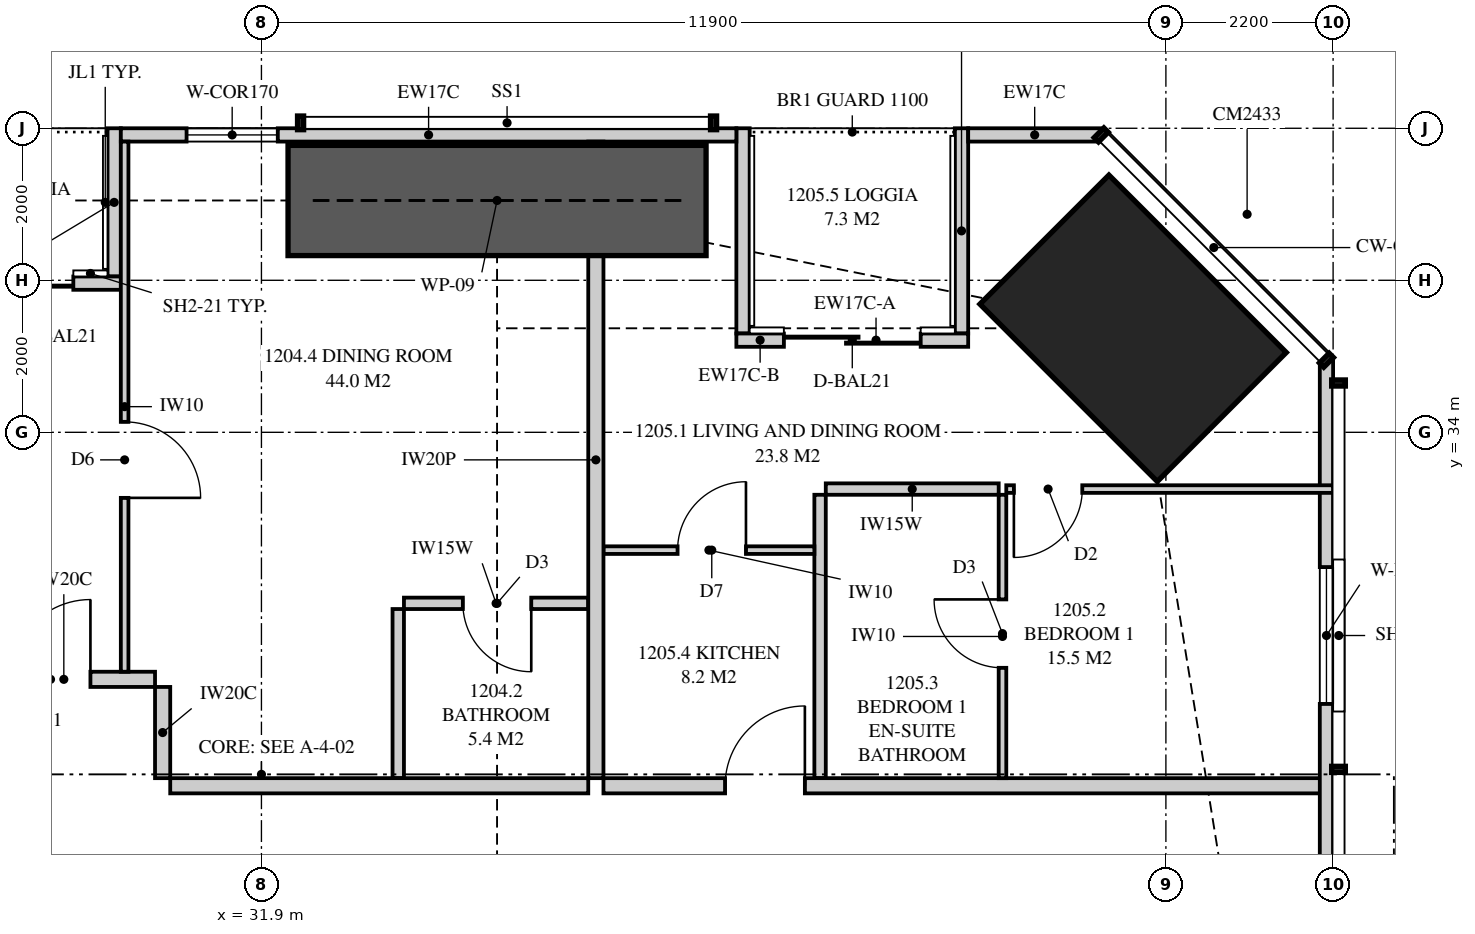
"""IFC4 building model, lengths in metres.
Left out: names, types, materials, properties, quantities, classifications, styles, units other than length and angle.
Written with IfcOpenShell. Run it as: python <this file> out.ifc"""

import sys

from ifc_helpers import new_model, si_unit, direction, frame, frame_2d, origin, origin_2d, place, context, subcontext, project, spatial, polyline, rectangle, outline, extrude, element, fill, save


model = new_model("IFC4")
c1 = context("Model", 3, precision=1e-05, world=origin(), true_north=direction((0.0, 1.0)))
c2 = subcontext(c1, "Body", "Model", "MODEL_VIEW")
j1 = project(units=[si_unit("LENGTHUNIT", "METRE"), si_unit("PLANEANGLEUNIT", "RADIAN")], contexts=[c1])
p1 = place(None, origin())
s1 = spatial("IfcSite", under=j1, at=p1, CompositionType="ELEMENT")
p2 = place(p1, origin())
s2 = spatial("IfcBuilding", under=s1, at=p2, CompositionType="ELEMENT")
p3 = place(p2, frame((0.0, 0.0, 47.8)))
s3 = spatial("IfcBuildingStorey", under=s2, at=p3, CompositionType="ELEMENT", Elevation=47.8)
p4 = place(p3, frame((43.369, 35.369, 0.0), z_axis=(0.0, 0.0, 1.0), x_axis=(-0.707106781187, -0.707106781187, 0.0)))
e1 = element("IfcColumn", 1, at=p4, inside=s3, PredefinedType="COLUMN", context=c2, shape_type="SweptSolid", body=[
    extrude(rectangle(XDim=2.4, YDim=3.3, at=origin_2d()), origin(), (0.0, 0.0, 1.0), 3.35),
])
p5 = place(p3, frame((45.913, 3.051, 0.0), z_axis=(0.0, 0.0, 1.0), x_axis=(0.0, 1.0, 0.0)))
e2 = element("IfcWall", 2, at=p5, inside=s3, PredefinedType="SOLIDWALL", context=c2, shape_type="SweptSolid", body=[
    extrude(outline(polyline([(0.0, 0.0), (31.897, 0.0), (31.897, 3.11), (22.167, 3.11), (22.167, 2.15), (22.074, 2.15), (22.074, 3.11), (21.949, 3.11), (21.949, 2.15), (9.949, 2.15), (9.949, 3.11), (9.823, 3.11), (9.823, 2.15), (9.73, 2.15), (9.73, 3.11), (0.0, 3.11), (0.0, 0.0)])), frame((0.0, 0.087, 0.0), z_axis=(0.0, -1.0, 0.0), x_axis=(1.0, 0.0, 0.0)), (0.0, 0.0, 1.0), 0.175),
])
p6 = place(p5, frame((2.222, 0.0, 0.4)))
e3 = element("IfcOpeningElement", 3, at=p6, cuts=e2, PredefinedType="OPENING", context=c2, shape_type="SweptSolid", body=[
    extrude(rectangle(XDim=1.8, YDim=1.7, at=frame_2d((0.9, 0.85))), frame((0.0, 0.097, 0.0), z_axis=(0.0, -1.0, 0.0), x_axis=(1.0, 0.0, 0.0)), (0.0, 0.0, 1.0), 0.195),
])
p7 = place(p5, frame((14.849, 0.0, 0.4)))
e4 = element("IfcOpeningElement", 4, at=p7, cuts=e2, PredefinedType="OPENING", context=c2, shape_type="SweptSolid", body=[
    extrude(rectangle(XDim=1.2, YDim=1.7, at=frame_2d((0.6, 0.85))), frame((0.0, 0.097, 0.0), z_axis=(0.0, -1.0, 0.0), x_axis=(1.0, 0.0, 0.0)), (0.0, 0.0, 1.0), 0.195),
])
p8 = place(p5, frame((27.375, 0.0, 0.4)))
e5 = element("IfcOpeningElement", 5, at=p8, cuts=e2, PredefinedType="OPENING", context=c2, shape_type="SweptSolid", body=[
    extrude(rectangle(XDim=1.8, YDim=1.7, at=frame_2d((0.9, 0.85))), frame((0.0, 0.097, 0.0), z_axis=(0.0, -1.0, 0.0), x_axis=(1.0, 0.0, 0.0)), (0.0, 0.0, 1.0), 0.195),
])
p9 = place(p3, frame((42.949, 37.913, 0.0), z_axis=(0.0, 0.0, 1.0), x_axis=(-1.0, 0.0, 0.0)))
e6 = element("IfcWall", 6, at=p9, inside=s3, PredefinedType="SOLIDWALL", context=c2, shape_type="SweptSolid", body=[
    extrude(rectangle(XDim=1.75, YDim=0.175, at=frame_2d((0.875, 0.0))), origin(), (0.0, 0.0, 1.0), 3.11),
])
p10 = place(p3, frame((38.149, 37.913, 0.0), z_axis=(0.0, 0.0, 1.0), x_axis=(-1.0, 0.0, 0.0)))
e7 = element("IfcWall", 7, at=p10, inside=s3, PredefinedType="SOLIDWALL", context=c2, shape_type="SweptSolid", body=[
    extrude(outline(polyline([(0.0, 0.0), (8.099, 0.0), (8.099, 2.15), (3.149, 2.15), (3.149, 3.11), (2.993, 3.11), (2.993, 2.15), (2.945, 2.15), (2.945, 3.11), (0.0, 3.11), (0.0, 0.0)])), frame((0.0, 0.087, 0.0), z_axis=(0.0, -1.0, 0.0), x_axis=(1.0, 0.0, 0.0)), (0.0, 0.0, 1.0), 0.175),
])
p11 = place(p10, frame((6.034, 0.0, 0.4)))
e8 = element("IfcOpeningElement", 8, at=p11, cuts=e7, PredefinedType="OPENING", context=c2, shape_type="SweptSolid", body=[
    extrude(rectangle(XDim=1.2, YDim=1.7, at=frame_2d((0.6, 0.85))), frame((0.0, 0.097, 0.0), z_axis=(0.0, -1.0, 0.0), x_axis=(1.0, 0.0, 0.0)), (0.0, 0.0, 1.0), 0.195),
])
p12 = place(p3, frame((41.199, 35.212, 0.0), z_axis=(0.0, 0.0, 1.0), x_axis=(-1.0, 0.0, 0.0)))
e9 = element("IfcWall", 9, at=p12, inside=s3, PredefinedType="SOLIDWALL", context=c2, shape_type="SweptSolid", body=[
    extrude(rectangle(XDim=2.425, YDim=0.175, at=frame_2d((1.212, 0.0))), origin(), (0.0, 0.0, 1.0), 2.15),
])
p13 = place(p12, frame((0.625, 0.0, 0.0)))
e10 = element("IfcOpeningElement", 10, at=p13, cuts=e9, PredefinedType="OPENING", context=c2, shape_type="SweptSolid", body=[
    extrude(rectangle(XDim=1.8, YDim=2.1, at=frame_2d((0.9, 1.05))), frame((0.0, 0.097, 0.0), z_axis=(0.0, -1.0, 0.0), x_axis=(1.0, 0.0, 0.0)), (0.0, 0.0, 1.0), 0.195),
])
p14 = place(p3, frame((38.774, 35.212, 0.0), z_axis=(0.0, 0.0, 1.0), x_axis=(-1.0, 0.0, 0.0)))
e11 = element("IfcWall", 11, at=p14, inside=s3, PredefinedType="SOLIDWALL", context=c2, shape_type="SweptSolid", body=[
    extrude(rectangle(XDim=0.625, YDim=0.175, at=frame_2d((0.312, 0.0))), origin(), (0.0, 0.0, 1.0), 2.51),
])
p15 = place(p3, frame((41.111, 38.0, 0.0), z_axis=(0.0, 0.0, 1.0), x_axis=(0.0, -1.0, 0.0)))
e12 = element("IfcWall", 12, at=p15, inside=s3, PredefinedType="SOLIDWALL", context=c2, shape_type="SweptSolid", body=[
    extrude(outline(polyline([(0.0, 0.0), (2.7, 0.0), (2.7, 2.15), (1.344, 2.15), (1.344, 3.11), (0.0, 3.11), (0.0, 0.0)])), frame((0.0, 0.087, 0.0), z_axis=(0.0, -1.0, 0.0), x_axis=(1.0, 0.0, 0.0)), (0.0, 0.0, 1.0), 0.175),
])
p16 = place(p3, frame((38.236, 38.0, 0.0), z_axis=(0.0, 0.0, 1.0), x_axis=(0.0, -1.0, 0.0)))
e13 = element("IfcWall", 13, at=p16, inside=s3, PredefinedType="SOLIDWALL", context=c2, shape_type="SweptSolid", body=[
    extrude(outline(polyline([(0.0, 0.0), (2.7, 0.0), (2.7, 2.51), (2.434, 2.51), (2.434, 2.15), (0.767, 2.15), (0.767, 3.11), (0.0, 3.11), (0.0, 0.0)])), frame((0.0, 0.087, 0.0), z_axis=(0.0, -1.0, 0.0), x_axis=(1.0, 0.0, 0.0)), (0.0, 0.0, 1.0), 0.175),
])
p17 = place(p3, frame((30.05, 35.962, 0.0), z_axis=(0.0, 0.0, 1.0), x_axis=(-1.0, 0.0, 0.0)))
e14 = element("IfcWall", 14, at=p17, inside=s3, PredefinedType="SOLIDWALL", context=c2, shape_type="SweptSolid", body=[
    extrude(rectangle(XDim=3.05, YDim=0.175, at=frame_2d((1.525, 0.0))), origin(), (0.0, 0.0, 1.0), 3.11),
])
p18 = place(p17, frame((0.625, 0.0, 0.0)))
e15 = element("IfcOpeningElement", 15, at=p18, cuts=e14, PredefinedType="OPENING", context=c2, shape_type="SweptSolid", body=[
    extrude(rectangle(XDim=1.8, YDim=2.1, at=frame_2d((0.9, 1.05))), frame((0.0, 0.097, 0.0), z_axis=(0.0, -1.0, 0.0), x_axis=(1.0, 0.0, 0.0)), (0.0, 0.0, 1.0), 0.195),
])
p19 = place(p3, frame((29.962, 38.0, 0.0), z_axis=(0.0, 0.0, 1.0), x_axis=(0.0, -1.0, 0.0)))
e16 = element("IfcWall", 16, at=p19, inside=s3, PredefinedType="SOLIDWALL", context=c2, shape_type="SweptSolid", body=[
    extrude(outline(polyline([(0.0, 0.0), (1.95, 0.0), (1.95, 3.11), (1.75, 3.11), (1.75, 2.15), (0.15, 2.15), (0.15, 3.11), (0.0, 3.11), (0.0, 0.0)])), frame((0.0, 0.087, 0.0), z_axis=(0.0, -1.0, 0.0), x_axis=(1.0, 0.0, 0.0)), (0.0, 0.0, 1.0), 0.175),
])
p20 = place(p3, frame((36.3, 37.825, 0.0), z_axis=(0.0, 0.0, 1.0), x_axis=(0.0, -1.0, 0.0)))
e17 = element("IfcWall", 17, at=p20, inside=s3, PredefinedType="PARTITIONING", context=c2, shape_type="SweptSolid", body=[
    extrude(outline(polyline([(0.108, 3.11), (0.0, 3.11), (0.0, 0.0), (0.529, 0.0), (0.529, 0.608), (1.021, 0.608), (1.021, 0.0), (8.375, 0.0), (8.375, 3.11), (3.766, 3.11), (3.766, 2.51), (1.964, 2.51), (1.964, 2.15), (1.021, 2.15), (1.021, 1.542), (0.529, 1.542), (0.529, 2.15), (0.108, 2.15), (0.108, 3.11)])), frame((0.0, 0.1, 0.0), z_axis=(0.0, -1.0, 0.0), x_axis=(1.0, 0.0, 0.0)), (0.0, 0.0, 1.0), 0.2),
])
p21 = place(p3, frame((33.775, 31.75, 0.0), z_axis=(0.0, 0.0, 1.0), x_axis=(1.0, 0.0, 0.0)))
e18 = element("IfcWall", 18, at=p21, inside=s3, PredefinedType="PLUMBINGWALL", context=c2, shape_type="SweptSolid", body=[
    extrude(outline(polyline([(0.0, 0.0), (2.425, 0.0), (2.425, 3.11), (1.537, 3.11), (1.537, 2.541), (0.913, 2.541), (0.913, 3.11), (0.0, 3.11), (0.0, 0.0)])), frame((0.0, 0.075, 0.0), z_axis=(0.0, -1.0, 0.0), x_axis=(1.0, 0.0, 0.0)), (0.0, 0.0, 1.0), 0.15),
])
p22 = place(p21, frame((0.775, 0.0, 0.0)))
e19 = element("IfcOpeningElement", 19, at=p22, cuts=e18, PredefinedType="OPENING", context=c2, shape_type="SweptSolid", body=[
    extrude(rectangle(XDim=0.9, YDim=2.1, at=frame_2d((0.45, 1.05))), frame((0.0, 0.085, 0.0), z_axis=(0.0, -1.0, 0.0), x_axis=(1.0, 0.0, 0.0)), (0.0, 0.0, 1.0), 0.17),
])
p23 = place(p3, frame((33.7, 31.675, 0.0), z_axis=(0.0, 0.0, 1.0), x_axis=(0.0, -1.0, 0.0)))
e20 = element("IfcWall", 20, at=p23, inside=s3, PredefinedType="PLUMBINGWALL", context=c2, shape_type="SweptSolid", body=[
    extrude(rectangle(XDim=2.225, YDim=0.15, at=frame_2d((1.113, 0.0))), origin(), (0.0, 0.0, 1.0), 3.11),
])
p24 = place(p3, frame((30.1, 37.825, 0.0), z_axis=(0.0, 0.0, 1.0), x_axis=(0.0, -1.0, 0.0)))
e21 = element("IfcWall", 21, at=p24, inside=s3, PredefinedType="PARTITIONING", context=c2, shape_type="SweptSolid", body=[
    extrude(outline(polyline([(0.0, 0.0), (6.975, 0.0), (6.975, 3.11), (1.635, 3.11), (1.635, 2.15), (0.0, 2.15), (0.0, 3.11), (0.0, 0.0)])), frame((0.0, 0.05, 0.0), z_axis=(0.0, -1.0, 0.0), x_axis=(1.0, 0.0, 0.0)), (0.0, 0.0, 1.0), 0.1),
])
p25 = place(p24, frame((3.688, 0.0, 0.0)))
e22 = element("IfcOpeningElement", 22, at=p25, cuts=e21, PredefinedType="OPENING", context=c2, shape_type="SweptSolid", body=[
    extrude(rectangle(XDim=1.0, YDim=2.1, at=frame_2d((0.5, 1.05))), frame((0.0, 0.06, 0.0), z_axis=(0.0, -1.0, 0.0), x_axis=(1.0, 0.0, 0.0)), (0.0, 0.0, 1.0), 0.12),
])
p26 = place(p3, frame((36.4, 29.35, 0.0), z_axis=(0.0, 0.0, 1.0), x_axis=(1.0, 0.0, 0.0)))
e23 = element("IfcWall", 23, at=p26, inside=s3, PredefinedType="PARTITIONING", context=c2, shape_type="SweptSolid", body=[
    extrude(outline(polyline([(0.0, 0.0), (9.6, 0.0), (9.6, 3.11), (8.866, 3.11), (8.866, 2.15), (7.023, 2.15), (7.023, 3.11), (0.0, 3.11), (0.0, 0.0)])), frame((0.0, 0.1, 0.0), z_axis=(0.0, -1.0, 0.0), x_axis=(1.0, 0.0, 0.0)), (0.0, 0.0, 1.0), 0.2),
])
p27 = place(p26, frame((1.6, 0.0, 0.0)))
e24 = element("IfcOpeningElement", 24, at=p27, cuts=e23, PredefinedType="OPENING", context=c2, shape_type="SweptSolid", body=[
    extrude(rectangle(XDim=1.05, YDim=2.2, at=frame_2d((0.525, 1.1))), frame((0.0, 0.11, 0.0), z_axis=(0.0, -1.0, 0.0), x_axis=(1.0, 0.0, 0.0)), (0.0, 0.0, 1.0), 0.22),
])
p28 = place(p3, frame((41.65, 33.178, 0.0), z_axis=(0.0, 0.0, 1.0), x_axis=(0.0, -1.0, 0.0)))
e25 = element("IfcWall", 25, at=p28, inside=s3, PredefinedType="PARTITIONING", context=c2, shape_type="SweptSolid", body=[
    extrude(rectangle(XDim=3.728, YDim=0.1, at=frame_2d((1.864, 0.0))), origin(), (0.0, 0.0, 1.0), 3.11),
])
p29 = place(p28, frame((1.377, 0.0, 0.0)))
e26 = element("IfcOpeningElement", 26, at=p29, cuts=e25, PredefinedType="OPENING", context=c2, shape_type="SweptSolid", body=[
    extrude(rectangle(XDim=0.9, YDim=2.1, at=frame_2d((0.45, 1.05))), frame((0.0, 0.06, 0.0), z_axis=(0.0, -1.0, 0.0), x_axis=(1.0, 0.0, 0.0)), (0.0, 0.0, 1.0), 0.12),
])
p30 = place(p3, frame((41.7, 33.253, 0.0), z_axis=(0.0, 0.0, 1.0), x_axis=(1.0, 0.0, 0.0)))
e27 = element("IfcWall", 27, at=p30, inside=s3, PredefinedType="PARTITIONING", context=c2, shape_type="SweptSolid", body=[
    extrude(outline(polyline([(0.0, 0.0), (4.3, 0.0), (4.3, 3.11), (2.883, 3.11), (2.883, 2.15), (1.14, 2.15), (1.14, 3.11), (0.0, 3.11), (0.0, 0.0)])), frame((0.0, 0.05, 0.0), z_axis=(0.0, -1.0, 0.0), x_axis=(1.0, 0.0, 0.0)), (0.0, 0.0, 1.0), 0.1),
])
p31 = place(p30, frame((0.1, 0.0, 0.0)))
e28 = element("IfcOpeningElement", 28, at=p31, cuts=e27, PredefinedType="OPENING", context=c2, shape_type="SweptSolid", body=[
    extrude(rectangle(XDim=0.9, YDim=2.1, at=frame_2d((0.45, 1.05))), frame((0.0, 0.06, 0.0), z_axis=(0.0, -1.0, 0.0), x_axis=(1.0, 0.0, 0.0)), (0.0, 0.0, 1.0), 0.12),
])
p32 = place(p3, frame((39.325, 33.253, 0.0), z_axis=(0.0, 0.0, 1.0), x_axis=(1.0, 0.0, 0.0)))
e29 = element("IfcWall", 29, at=p32, inside=s3, PredefinedType="PLUMBINGWALL", context=c2, shape_type="SweptSolid", body=[
    extrude(rectangle(XDim=2.275, YDim=0.15, at=frame_2d((1.138, 0.0))), origin(), (0.0, 0.0, 1.0), 3.11),
])
p33 = place(p3, frame((39.25, 33.178, 0.0), z_axis=(0.0, 0.0, 1.0), x_axis=(0.0, -1.0, 0.0)))
e30 = element("IfcWall", 30, at=p33, inside=s3, PredefinedType="PLUMBINGWALL", context=c2, shape_type="SweptSolid", body=[
    extrude(rectangle(XDim=3.728, YDim=0.15, at=frame_2d((1.864, 0.0))), origin(), (0.0, 0.0, 1.0), 3.11),
])
p34 = place(p3, frame((36.4, 32.45, 0.0), z_axis=(0.0, 0.0, 1.0), x_axis=(1.0, 0.0, 0.0)))
e31 = element("IfcWall", 31, at=p34, inside=s3, PredefinedType="PARTITIONING", context=c2, shape_type="SweptSolid", body=[
    extrude(rectangle(XDim=2.775, YDim=0.1, at=frame_2d((1.388, 0.0))), origin(), (0.0, 0.0, 1.0), 3.11),
])
p35 = place(p34, frame((0.975, 0.0, 0.0)))
e32 = element("IfcOpeningElement", 32, at=p35, cuts=e31, PredefinedType="OPENING", context=c2, shape_type="SweptSolid", body=[
    extrude(rectangle(XDim=0.9, YDim=2.1, at=frame_2d((0.45, 1.05))), frame((0.0, 0.06, 0.0), z_axis=(0.0, -1.0, 0.0), x_axis=(1.0, 0.0, 0.0)), (0.0, 0.0, 1.0), 0.12),
])
p36 = place(p3, frame((30.7, 29.35, 0.0), z_axis=(0.0, 0.0, 1.0), x_axis=(1.0, 0.0, 0.0)))
e33 = element("IfcWall", 33, at=p36, inside=s3, PredefinedType="PARTITIONING", context=c2, shape_type="SweptSolid", body=[
    extrude(outline(polyline([(0.0, 0.0), (5.5, 0.0), (5.5, 3.11), (4.637, 3.11), (4.637, 2.541), (3.963, 2.541), (3.963, 3.11), (0.0, 3.11), (0.0, 0.0)])), frame((0.0, 0.1, 0.0), z_axis=(0.0, -1.0, 0.0), x_axis=(1.0, 0.0, 0.0)), (0.0, 0.0, 1.0), 0.2),
])
p37 = place(p3, frame((28.1, 30.75, 0.0), z_axis=(0.0, 0.0, 1.0), x_axis=(1.0, 0.0, 0.0)))
e34 = element("IfcWall", 34, at=p37, inside=s3, PredefinedType="PARTITIONING", context=c2, shape_type="SweptSolid", body=[
    extrude(rectangle(XDim=2.4, YDim=0.2, at=frame_2d((1.2, 0.0))), origin(), (0.0, 0.0, 1.0), 3.11),
])
p38 = place(p37, frame((0.5, 0.0, 0.0)))
e35 = element("IfcOpeningElement", 35, at=p38, cuts=e34, PredefinedType="OPENING", context=c2, shape_type="SweptSolid", body=[
    extrude(rectangle(XDim=1.05, YDim=2.2, at=frame_2d((0.525, 1.1))), frame((0.0, 0.11, 0.0), z_axis=(0.0, -1.0, 0.0), x_axis=(1.0, 0.0, 0.0)), (0.0, 0.0, 1.0), 0.22),
])
p39 = place(p3, frame((30.6, 29.45, 0.0), z_axis=(0.0, 0.0, 1.0), x_axis=(0.0, 1.0, 0.0)))
e36 = element("IfcWall", 36, at=p39, inside=s3, PredefinedType="PARTITIONING", context=c2, shape_type="SweptSolid", body=[
    extrude(rectangle(XDim=1.2, YDim=0.2, at=frame_2d((0.6, 0.0))), origin(), (0.0, 0.0, 1.0), 3.11),
])
p40 = place(p3, frame((32.25, 37.05, 0.0), z_axis=(0.0, 0.0, 1.0), x_axis=(1.0, 0.0, 0.0)))
e37 = element("IfcWall", 37, at=p40, inside=s3, PredefinedType="SHEAR", context=c2, shape_type="SweptSolid", body=[
    extrude(rectangle(XDim=5.5, YDim=1.45, at=frame_2d((2.75, 0.0))), origin(), (0.0, 0.0, 1.0), 3.35),
])
p41 = place(p8, origin())
e38 = element("IfcWindow", 38, at=p41, inside=s3, PartitioningType="SINGLE_PANEL", PredefinedType="WINDOW", context=c2, shape_type="SweptSolid", body=[
    extrude(rectangle(XDim=1.8, YDim=1.7, at=frame_2d((0.9, 0.85))), frame((0.0, 0.03, 0.0), z_axis=(0.0, -1.0, 0.0), x_axis=(1.0, 0.0, 0.0)), (0.0, 0.0, 1.0), 0.06),
])
fill(e5, e38)
p42 = place(p13, origin())
e39 = element("IfcDoor", 39, at=p42, inside=s3, OperationType="SLIDING_TO_LEFT", PredefinedType="DOOR", context=c2, shape_type="SweptSolid", body=[
    extrude(rectangle(XDim=1.8, YDim=2.1, at=frame_2d((0.9, 1.05))), frame((0.0, 0.025, 0.0), z_axis=(0.0, -1.0, 0.0), x_axis=(1.0, 0.0, 0.0)), (0.0, 0.0, 1.0), 0.05),
])
fill(e10, e39)
p43 = place(p11, origin())
e40 = element("IfcWindow", 40, at=p43, inside=s3, PartitioningType="SINGLE_PANEL", PredefinedType="WINDOW", context=c2, shape_type="SweptSolid", body=[
    extrude(rectangle(XDim=1.2, YDim=1.7, at=frame_2d((0.6, 0.85))), frame((0.0, 0.03, 0.0), z_axis=(0.0, -1.0, 0.0), x_axis=(1.0, 0.0, 0.0)), (0.0, 0.0, 1.0), 0.06),
])
fill(e8, e40)
p44 = place(p18, origin())
e41 = element("IfcDoor", 41, at=p44, inside=s3, OperationType="SLIDING_TO_LEFT", PredefinedType="DOOR", context=c2, shape_type="SweptSolid", body=[
    extrude(rectangle(XDim=1.8, YDim=2.1, at=frame_2d((0.9, 1.05))), frame((0.0, 0.025, 0.0), z_axis=(0.0, -1.0, 0.0), x_axis=(1.0, 0.0, 0.0)), (0.0, 0.0, 1.0), 0.05),
])
fill(e15, e41)
p45 = place(p38, origin())
e42 = element("IfcDoor", 42, at=p45, inside=s3, OperationType="SINGLE_SWING_RIGHT", PredefinedType="DOOR", context=c2, shape_type="SweptSolid", body=[
    extrude(rectangle(XDim=1.05, YDim=2.2, at=frame_2d((0.525, 1.1))), frame((0.0, 0.025, 0.0), z_axis=(0.0, -1.0, 0.0), x_axis=(1.0, 0.0, 0.0)), (0.0, 0.0, 1.0), 0.05),
])
fill(e35, e42)
p46 = place(p22, frame((0.9, 0.0, 0.0), z_axis=(0.0, 0.0, 1.0), x_axis=(-1.0, 0.0, 0.0)))
e43 = element("IfcDoor", 43, at=p46, inside=s3, OperationType="SINGLE_SWING_LEFT", PredefinedType="DOOR", context=c2, shape_type="SweptSolid", body=[
    extrude(rectangle(XDim=0.9, YDim=2.1, at=frame_2d((0.45, 1.05))), frame((0.0, 0.025, 0.0), z_axis=(0.0, -1.0, 0.0), x_axis=(1.0, 0.0, 0.0)), (0.0, 0.0, 1.0), 0.05),
])
fill(e19, e43)
p47 = place(p25, origin())
e44 = element("IfcDoor", 44, at=p47, inside=s3, OperationType="SINGLE_SWING_RIGHT", PredefinedType="DOOR", context=c2, shape_type="SweptSolid", body=[
    extrude(rectangle(XDim=1.0, YDim=2.1, at=frame_2d((0.5, 1.05))), frame((0.0, 0.025, 0.0), z_axis=(0.0, -1.0, 0.0), x_axis=(1.0, 0.0, 0.0)), (0.0, 0.0, 1.0), 0.05),
])
fill(e22, e44)
p48 = place(p27, origin())
e45 = element("IfcDoor", 45, at=p48, inside=s3, OperationType="SINGLE_SWING_RIGHT", PredefinedType="DOOR", context=c2, shape_type="SweptSolid", body=[
    extrude(rectangle(XDim=1.05, YDim=2.2, at=frame_2d((0.525, 1.1))), frame((0.0, 0.025, 0.0), z_axis=(0.0, -1.0, 0.0), x_axis=(1.0, 0.0, 0.0)), (0.0, 0.0, 1.0), 0.05),
])
fill(e24, e45)
p49 = place(p31, frame((0.9, 0.0, 0.0), z_axis=(0.0, 0.0, 1.0), x_axis=(-1.0, 0.0, 0.0)))
e46 = element("IfcDoor", 46, at=p49, inside=s3, OperationType="SINGLE_SWING_RIGHT", PredefinedType="DOOR", context=c2, shape_type="SweptSolid", body=[
    extrude(rectangle(XDim=0.9, YDim=2.1, at=frame_2d((0.45, 1.05))), frame((0.0, 0.025, 0.0), z_axis=(0.0, -1.0, 0.0), x_axis=(1.0, 0.0, 0.0)), (0.0, 0.0, 1.0), 0.05),
])
fill(e28, e46)
p50 = place(p29, frame((0.9, 0.0, 0.0), z_axis=(0.0, 0.0, 1.0), x_axis=(-1.0, 0.0, 0.0)))
e47 = element("IfcDoor", 47, at=p50, inside=s3, OperationType="SINGLE_SWING_RIGHT", PredefinedType="DOOR", context=c2, shape_type="SweptSolid", body=[
    extrude(rectangle(XDim=0.9, YDim=2.1, at=frame_2d((0.45, 1.05))), frame((0.0, 0.025, 0.0), z_axis=(0.0, -1.0, 0.0), x_axis=(1.0, 0.0, 0.0)), (0.0, 0.0, 1.0), 0.05),
])
fill(e26, e47)
p51 = place(p35, origin())
e48 = element("IfcDoor", 48, at=p51, inside=s3, OperationType="SINGLE_SWING_RIGHT", PredefinedType="DOOR", context=c2, shape_type="SweptSolid", body=[
    extrude(rectangle(XDim=0.9, YDim=2.1, at=frame_2d((0.45, 1.05))), frame((0.0, 0.025, 0.0), z_axis=(0.0, -1.0, 0.0), x_axis=(1.0, 0.0, 0.0)), (0.0, 0.0, 1.0), 0.05),
])
fill(e32, e48)
save(model, sys.argv[1])
